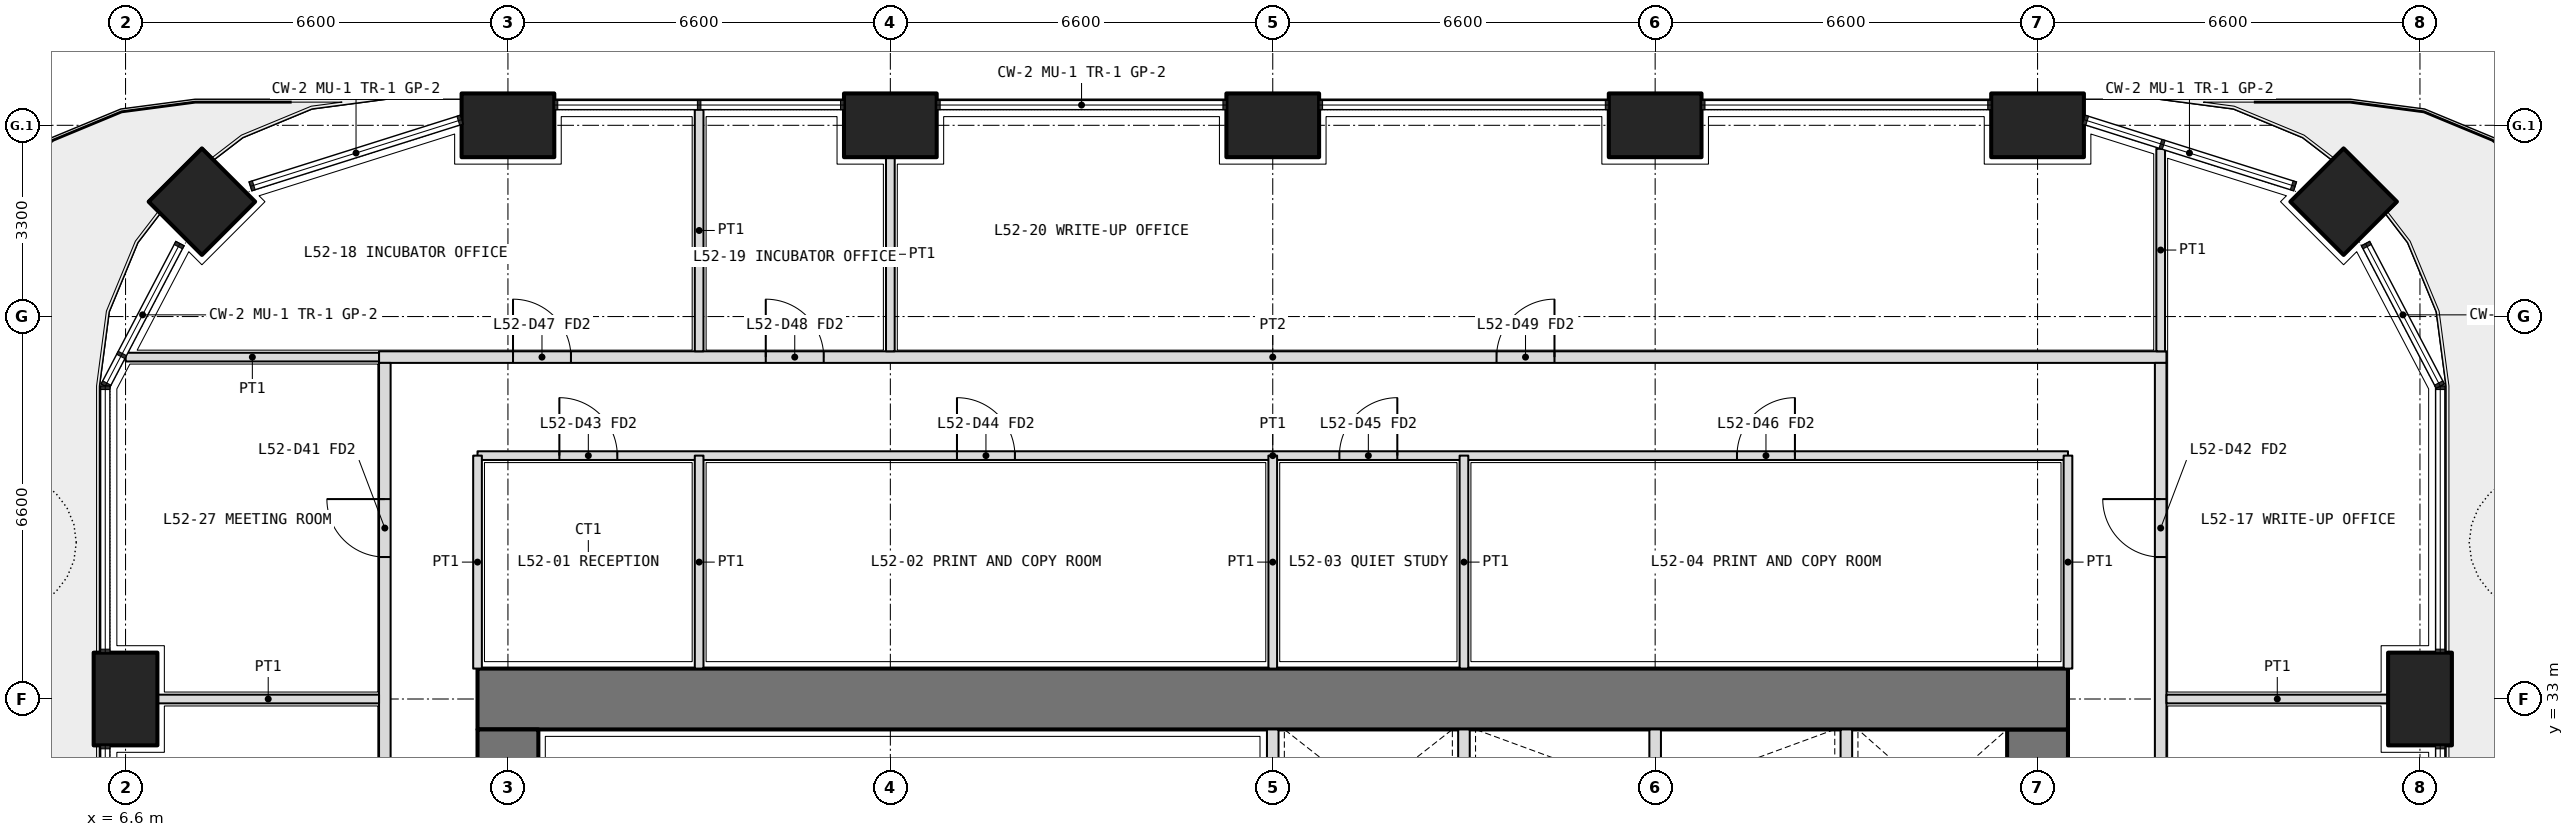
"""IFC4 building model, lengths in metres.
Left out: names, types, materials, properties, quantities, classifications, styles, units other than length and angle.
Written with IfcOpenShell. Run it as: python <this file> out.ifc"""

import sys

from ifc_helpers import new_model, si_unit, direction, frame, frame_2d, origin, origin_2d, place, context, subcontext, project, spatial, rectangle, extrude, element, fill, save


model = new_model("IFC4")
c1 = context("Model", 3, precision=1e-05, world=origin(), true_north=direction((0.0, 1.0)))
c2 = subcontext(c1, "Body", "Model", "MODEL_VIEW")
j1 = project(units=[si_unit("LENGTHUNIT", "METRE"), si_unit("PLANEANGLEUNIT", "RADIAN")], contexts=[c1])
p1 = place(None, origin())
s1 = spatial("IfcSite", under=j1, at=p1, CompositionType="ELEMENT")
p2 = place(p1, origin())
s2 = spatial("IfcBuilding", under=s1, at=p2, CompositionType="ELEMENT")
p3 = place(p2, frame((0.0, 0.0, 229.2)))
s3 = spatial("IfcBuildingStorey", under=s2, at=p3, CompositionType="ELEMENT", Elevation=229.2)
for number, where, z_axis, x_axis in (
    (1, (7.918, 41.582, 0.0), (0.0, 0.0, 1.0), (0.707, 0.707, 0.0)),
    (2, (44.882, 41.582, 0.0), (0.0, 0.0, 1.0), (0.707, 0.707, 0.0)),
):
    element("IfcColumn", number, at=place(p3, frame(where, z_axis=z_axis, x_axis=x_axis)), inside=s3, PredefinedType="COLUMN", context=c2, shape_type="SweptSolid", body=[
        extrude(rectangle(XDim=1.3, YDim=1.3, at=origin_2d()), origin(), (0.0, 0.0, 1.0), 4.2),
    ])
for number, where, z_axis, x_axis in (
    (3, (6.6, 33.0, 0.0), (0.0, 0.0, 1.0), (0.0, 1.0, 0.0)),
    (4, (46.2, 33.0, 0.0), (0.0, 0.0, 1.0), (0.0, 1.0, 0.0)),
    (5, (13.2, 42.9, 0.0), (0.0, 0.0, 1.0), (1.0, 0.0, 0.0)),
    (6, (19.8, 42.9, 0.0), (0.0, 0.0, 1.0), (1.0, 0.0, 0.0)),
    (7, (26.4, 42.9, 0.0), (0.0, 0.0, 1.0), (1.0, 0.0, 0.0)),
    (8, (33.0, 42.9, 0.0), (0.0, 0.0, 1.0), (1.0, 0.0, 0.0)),
    (9, (39.6, 42.9, 0.0), (0.0, 0.0, 1.0), (1.0, 0.0, 0.0)),
):
    element("IfcColumn", number, at=place(p3, frame(where, z_axis=z_axis, x_axis=x_axis)), inside=s3, PredefinedType="COLUMN", context=c2, shape_type="SweptSolid", body=[
        extrude(rectangle(XDim=1.6, YDim=1.1, at=origin_2d()), origin(), (0.0, 0.0, 1.0), 4.2),
    ])
p4 = place(p3, frame((39.6, 13.725, 0.0), z_axis=(0.0, 0.0, 1.0), x_axis=(0.0, 1.0, 0.0)))
e10 = element("IfcWall", 10, at=p4, inside=s3, PredefinedType="SHEAR", context=c2, shape_type="SweptSolid", body=[
    extrude(rectangle(XDim=18.75, YDim=1.05, at=frame_2d((9.375, 0.0))), origin(), (0.0, 0.0, 1.0), 4.2),
])
p5 = place(p4, frame((3.025, 0.0, 0.0)))
e11 = element("IfcOpeningElement", 11, at=p5, cuts=e10, PredefinedType="OPENING", context=c2, shape_type="SweptSolid", body=[
    extrude(rectangle(XDim=1.6, YDim=2.1, at=frame_2d((0.8, 1.05))), frame((0.0, 0.535, 0.0), z_axis=(0.0, -1.0, 0.0), x_axis=(1.0, 0.0, 0.0)), (0.0, 0.0, 1.0), 1.07),
])
p6 = place(p4, frame((13.825, 0.0, 0.0)))
e12 = element("IfcOpeningElement", 12, at=p6, cuts=e10, PredefinedType="OPENING", context=c2, shape_type="SweptSolid", body=[
    extrude(rectangle(XDim=1.6, YDim=2.1, at=frame_2d((0.8, 1.05))), frame((0.0, 0.535, 0.0), z_axis=(0.0, -1.0, 0.0), x_axis=(1.0, 0.0, 0.0)), (0.0, 0.0, 1.0), 1.07),
])
p7 = place(p3, frame((40.125, 33.0, 0.0), z_axis=(0.0, 0.0, 1.0), x_axis=(-1.0, 0.0, 0.0)))
e13 = element("IfcWall", 13, at=p7, inside=s3, PredefinedType="SHEAR", context=c2, shape_type="SweptSolid", body=[
    extrude(rectangle(XDim=27.45, YDim=1.05, at=frame_2d((13.725, 0.0))), origin(), (0.0, 0.0, 1.0), 4.2),
])
p8 = place(p3, frame((13.2, 32.475, 0.0), z_axis=(0.0, 0.0, 1.0), x_axis=(0.0, -1.0, 0.0)))
e14 = element("IfcWall", 14, at=p8, inside=s3, PredefinedType="SHEAR", context=c2, shape_type="SweptSolid", body=[
    extrude(rectangle(XDim=18.75, YDim=1.05, at=frame_2d((9.375, 0.0))), origin(), (0.0, 0.0, 1.0), 4.2),
])
p9 = place(p8, frame((14.125, 0.0, 0.0)))
e15 = element("IfcOpeningElement", 15, at=p9, cuts=e14, PredefinedType="OPENING", context=c2, shape_type="SweptSolid", body=[
    extrude(rectangle(XDim=1.6, YDim=2.1, at=frame_2d((0.8, 1.05))), frame((0.0, 0.535, 0.0), z_axis=(0.0, -1.0, 0.0), x_axis=(1.0, 0.0, 0.0)), (0.0, 0.0, 1.0), 1.07),
])
p10 = place(p8, frame((3.325, 0.0, 0.0)))
e16 = element("IfcOpeningElement", 16, at=p10, cuts=e14, PredefinedType="OPENING", context=c2, shape_type="SweptSolid", body=[
    extrude(rectangle(XDim=1.6, YDim=2.1, at=frame_2d((0.8, 1.05))), frame((0.0, 0.535, 0.0), z_axis=(0.0, -1.0, 0.0), x_axis=(1.0, 0.0, 0.0)), (0.0, 0.0, 1.0), 1.07),
])
for number, where, z_axis, x_axis in (
    (17, (26.4, 30.2, 0.0), (0.0, 0.0, 1.0), (0.0, 1.0, 0.0)),
    (18, (29.7, 30.2, 0.0), (0.0, 0.0, 1.0), (0.0, 1.0, 0.0)),
    (19, (33.0, 30.2, 0.0), (0.0, 0.0, 1.0), (0.0, 1.0, 0.0)),
    (20, (36.3, 30.2, 0.0), (0.0, 0.0, 1.0), (0.0, 1.0, 0.0)),
):
    element("IfcWall", number, at=place(p3, frame(where, z_axis=z_axis, x_axis=x_axis)), inside=s3, PredefinedType="PARTITIONING", context=c2, shape_type="SweptSolid", body=[
        extrude(rectangle(XDim=2.275, YDim=0.2, at=frame_2d((1.138, 0.0))), origin(), (0.0, 0.0, 1.0), 4.2),
    ])
p11 = place(p3, frame((12.675, 37.2, 0.0), z_axis=(0.0, 0.0, 1.0), x_axis=(1.0, 0.0, 0.0)))
e21 = element("IfcWall", 21, at=p11, inside=s3, PredefinedType="PARTITIONING", context=c2, shape_type="SweptSolid", body=[
    extrude(rectangle(XDim=27.45, YDim=0.15, at=frame_2d((13.725, 0.0))), origin(), (0.0, 0.0, 1.0), 3.0),
])
p12 = place(p11, frame((1.413, 0.0, 0.0)))
e22 = element("IfcOpeningElement", 22, at=p12, cuts=e21, PredefinedType="OPENING", context=c2, shape_type="SweptSolid", body=[
    extrude(rectangle(XDim=1.0, YDim=2.1, at=frame_2d((0.5, 1.05))), frame((0.0, 0.085, 0.0), z_axis=(0.0, -1.0, 0.0), x_axis=(1.0, 0.0, 0.0)), (0.0, 0.0, 1.0), 0.17),
])
p13 = place(p11, frame((8.275, 0.0, 0.0)))
e23 = element("IfcOpeningElement", 23, at=p13, cuts=e21, PredefinedType="OPENING", context=c2, shape_type="SweptSolid", body=[
    extrude(rectangle(XDim=1.0, YDim=2.1, at=frame_2d((0.5, 1.05))), frame((0.0, 0.085, 0.0), z_axis=(0.0, -1.0, 0.0), x_axis=(1.0, 0.0, 0.0)), (0.0, 0.0, 1.0), 0.17),
])
p14 = place(p11, frame((14.875, 0.0, 0.0)))
e24 = element("IfcOpeningElement", 24, at=p14, cuts=e21, PredefinedType="OPENING", context=c2, shape_type="SweptSolid", body=[
    extrude(rectangle(XDim=1.0, YDim=2.1, at=frame_2d((0.5, 1.05))), frame((0.0, 0.085, 0.0), z_axis=(0.0, -1.0, 0.0), x_axis=(1.0, 0.0, 0.0)), (0.0, 0.0, 1.0), 0.17),
])
p15 = place(p11, frame((21.738, 0.0, 0.0)))
e25 = element("IfcOpeningElement", 25, at=p15, cuts=e21, PredefinedType="OPENING", context=c2, shape_type="SweptSolid", body=[
    extrude(rectangle(XDim=1.0, YDim=2.1, at=frame_2d((0.5, 1.05))), frame((0.0, 0.085, 0.0), z_axis=(0.0, -1.0, 0.0), x_axis=(1.0, 0.0, 0.0)), (0.0, 0.0, 1.0), 0.17),
])
for number, where, z_axis, x_axis in (
    (26, (12.675, 33.525, 0.0), (0.0, 0.0, 1.0), (0.0, 1.0, 0.0)),
    (27, (40.125, 33.525, 0.0), (0.0, 0.0, 1.0), (0.0, 1.0, 0.0)),
):
    element("IfcWall", number, at=place(p3, frame(where, z_axis=z_axis, x_axis=x_axis)), inside=s3, PredefinedType="PARTITIONING", context=c2, shape_type="SweptSolid", body=[
        extrude(rectangle(XDim=3.675, YDim=0.15, at=frame_2d((1.837, 0.0))), origin(), (0.0, 0.0, 1.0), 3.0),
    ])
p16 = place(p3, frame((16.5, 33.525, 0.0), z_axis=(0.0, 0.0, 1.0), x_axis=(0.0, 1.0, 0.0)))
e28 = element("IfcWall", 28, at=p16, inside=s3, PredefinedType="PARTITIONING", context=c2, shape_type="SweptSolid", body=[
    extrude(rectangle(XDim=3.675, YDim=0.15, at=frame_2d((1.837, 0.0))), origin(), (0.0, 0.0, 1.0), 3.9),
])
p17 = place(p3, frame((26.4, 33.525, 0.0), z_axis=(0.0, 0.0, 1.0), x_axis=(0.0, 1.0, 0.0)))
e29 = element("IfcWall", 29, at=p17, inside=s3, PredefinedType="PARTITIONING", context=c2, shape_type="SweptSolid", body=[
    extrude(rectangle(XDim=3.675, YDim=0.15, at=frame_2d((1.837, 0.0))), origin(), (0.0, 0.0, 1.0), 3.0),
])
p18 = place(p3, frame((29.7, 33.525, 0.0), z_axis=(0.0, 0.0, 1.0), x_axis=(0.0, 1.0, 0.0)))
e30 = element("IfcWall", 30, at=p18, inside=s3, PredefinedType="PARTITIONING", context=c2, shape_type="SweptSolid", body=[
    extrude(rectangle(XDim=3.675, YDim=0.15, at=frame_2d((1.837, 0.0))), origin(), (0.0, 0.0, 1.0), 3.9),
])
p19 = place(p3, frame((10.975, 38.9, 0.0), z_axis=(0.0, 0.0, 1.0), x_axis=(1.0, 0.0, 0.0)))
e31 = element("IfcWall", 31, at=p19, inside=s3, PredefinedType="PARTITIONING", context=c2, shape_type="SweptSolid", body=[
    extrude(rectangle(XDim=30.85, YDim=0.2, at=frame_2d((15.425, 0.0))), origin(), (0.0, 0.0, 1.0), 3.0),
])
p20 = place(p19, frame((2.312, 0.0, 0.0)))
e32 = element("IfcOpeningElement", 32, at=p20, cuts=e31, PredefinedType="OPENING", context=c2, shape_type="SweptSolid", body=[
    extrude(rectangle(XDim=1.0, YDim=2.1, at=frame_2d((0.5, 1.05))), frame((0.0, 0.11, 0.0), z_axis=(0.0, -1.0, 0.0), x_axis=(1.0, 0.0, 0.0)), (0.0, 0.0, 1.0), 0.22),
])
p21 = place(p19, frame((6.675, 0.0, 0.0)))
e33 = element("IfcOpeningElement", 33, at=p21, cuts=e31, PredefinedType="OPENING", context=c2, shape_type="SweptSolid", body=[
    extrude(rectangle(XDim=1.0, YDim=2.1, at=frame_2d((0.5, 1.05))), frame((0.0, 0.11, 0.0), z_axis=(0.0, -1.0, 0.0), x_axis=(1.0, 0.0, 0.0)), (0.0, 0.0, 1.0), 0.22),
])
p22 = place(p19, frame((19.288, 0.0, 0.0)))
e34 = element("IfcOpeningElement", 34, at=p22, cuts=e31, PredefinedType="OPENING", context=c2, shape_type="SweptSolid", body=[
    extrude(rectangle(XDim=1.0, YDim=2.1, at=frame_2d((0.5, 1.05))), frame((0.0, 0.11, 0.0), z_axis=(0.0, -1.0, 0.0), x_axis=(1.0, 0.0, 0.0)), (0.0, 0.0, 1.0), 0.22),
])
p23 = place(p3, frame((11.075, 7.4, 0.0), z_axis=(0.0, 0.0, 1.0), x_axis=(0.0, 1.0, 0.0)))
e35 = element("IfcWall", 35, at=p23, inside=s3, PredefinedType="PARTITIONING", context=c2, shape_type="SweptSolid", body=[
    extrude(rectangle(XDim=31.4, YDim=0.2, at=frame_2d((15.7, 0.0))), origin(), (0.0, 0.0, 1.0), 3.0),
])
p24 = place(p23, frame((2.35, 0.0, 0.0)))
e36 = element("IfcOpeningElement", 36, at=p24, cuts=e35, PredefinedType="OPENING", context=c2, shape_type="SweptSolid", body=[
    extrude(rectangle(XDim=1.0, YDim=2.1, at=frame_2d((0.5, 1.05))), frame((0.0, 0.11, 0.0), z_axis=(0.0, -1.0, 0.0), x_axis=(1.0, 0.0, 0.0)), (0.0, 0.0, 1.0), 0.22),
])
p25 = place(p23, frame((6.35, 0.0, 0.0)))
e37 = element("IfcOpeningElement", 37, at=p25, cuts=e35, PredefinedType="OPENING", context=c2, shape_type="SweptSolid", body=[
    extrude(rectangle(XDim=1.0, YDim=2.1, at=frame_2d((0.5, 1.05))), frame((0.0, 0.11, 0.0), z_axis=(0.0, -1.0, 0.0), x_axis=(1.0, 0.0, 0.0)), (0.0, 0.0, 1.0), 0.22),
])
p26 = place(p23, frame((9.45, 0.0, 0.0)))
e38 = element("IfcOpeningElement", 38, at=p26, cuts=e35, PredefinedType="OPENING", context=c2, shape_type="SweptSolid", body=[
    extrude(rectangle(XDim=0.9, YDim=2.1, at=frame_2d((0.45, 1.05))), frame((0.0, 0.11, 0.0), z_axis=(0.0, -1.0, 0.0), x_axis=(1.0, 0.0, 0.0)), (0.0, 0.0, 1.0), 0.22),
])
p27 = place(p23, frame((13.35, 0.0, 0.0)))
e39 = element("IfcOpeningElement", 39, at=p27, cuts=e35, PredefinedType="OPENING", context=c2, shape_type="SweptSolid", body=[
    extrude(rectangle(XDim=0.9, YDim=2.1, at=frame_2d((0.45, 1.05))), frame((0.0, 0.11, 0.0), z_axis=(0.0, -1.0, 0.0), x_axis=(1.0, 0.0, 0.0)), (0.0, 0.0, 1.0), 0.22),
])
p28 = place(p23, frame((16.85, 0.0, 0.0)))
e40 = element("IfcOpeningElement", 40, at=p28, cuts=e35, PredefinedType="OPENING", context=c2, shape_type="SweptSolid", body=[
    extrude(rectangle(XDim=1.0, YDim=2.1, at=frame_2d((0.5, 1.05))), frame((0.0, 0.11, 0.0), z_axis=(0.0, -1.0, 0.0), x_axis=(1.0, 0.0, 0.0)), (0.0, 0.0, 1.0), 0.22),
])
p29 = place(p23, frame((21.8, 0.0, 0.0)))
e41 = element("IfcOpeningElement", 41, at=p29, cuts=e35, PredefinedType="OPENING", context=c2, shape_type="SweptSolid", body=[
    extrude(rectangle(XDim=1.0, YDim=2.1, at=frame_2d((0.5, 1.05))), frame((0.0, 0.11, 0.0), z_axis=(0.0, -1.0, 0.0), x_axis=(1.0, 0.0, 0.0)), (0.0, 0.0, 1.0), 0.22),
])
p30 = place(p23, frame((28.05, 0.0, 0.0)))
e42 = element("IfcOpeningElement", 42, at=p30, cuts=e35, PredefinedType="OPENING", context=c2, shape_type="SweptSolid", body=[
    extrude(rectangle(XDim=1.0, YDim=2.1, at=frame_2d((0.5, 1.05))), frame((0.0, 0.11, 0.0), z_axis=(0.0, -1.0, 0.0), x_axis=(1.0, 0.0, 0.0)), (0.0, 0.0, 1.0), 0.22),
])
p31 = place(p3, frame((41.725, 19.8, 0.0), z_axis=(0.0, 0.0, 1.0), x_axis=(0.0, 1.0, 0.0)))
e43 = element("IfcWall", 43, at=p31, inside=s3, PredefinedType="PARTITIONING", context=c2, shape_type="SweptSolid", body=[
    extrude(rectangle(XDim=19.0, YDim=0.2, at=frame_2d((9.5, 0.0))), origin(), (0.0, 0.0, 1.0), 3.0),
])
p32 = place(p31, frame((1.1, 0.0, 0.0)))
e44 = element("IfcOpeningElement", 44, at=p32, cuts=e43, PredefinedType="OPENING", context=c2, shape_type="SweptSolid", body=[
    extrude(rectangle(XDim=1.0, YDim=2.1, at=frame_2d((0.5, 1.05))), frame((0.0, 0.11, 0.0), z_axis=(0.0, -1.0, 0.0), x_axis=(1.0, 0.0, 0.0)), (0.0, 0.0, 1.0), 0.22),
])
p33 = place(p31, frame((4.45, 0.0, 0.0)))
e45 = element("IfcOpeningElement", 45, at=p33, cuts=e43, PredefinedType="OPENING", context=c2, shape_type="SweptSolid", body=[
    extrude(rectangle(XDim=0.9, YDim=2.1, at=frame_2d((0.45, 1.05))), frame((0.0, 0.11, 0.0), z_axis=(0.0, -1.0, 0.0), x_axis=(1.0, 0.0, 0.0)), (0.0, 0.0, 1.0), 0.22),
])
p34 = place(p31, frame((9.4, 0.0, 0.0)))
e46 = element("IfcOpeningElement", 46, at=p34, cuts=e43, PredefinedType="OPENING", context=c2, shape_type="SweptSolid", body=[
    extrude(rectangle(XDim=1.0, YDim=2.1, at=frame_2d((0.5, 1.05))), frame((0.0, 0.11, 0.0), z_axis=(0.0, -1.0, 0.0), x_axis=(1.0, 0.0, 0.0)), (0.0, 0.0, 1.0), 0.22),
])
p35 = place(p31, frame((15.65, 0.0, 0.0)))
e47 = element("IfcOpeningElement", 47, at=p35, cuts=e43, PredefinedType="OPENING", context=c2, shape_type="SweptSolid", body=[
    extrude(rectangle(XDim=1.0, YDim=2.1, at=frame_2d((0.5, 1.05))), frame((0.0, 0.11, 0.0), z_axis=(0.0, -1.0, 0.0), x_axis=(1.0, 0.0, 0.0)), (0.0, 0.0, 1.0), 0.22),
])
p36 = place(p3, frame((41.725, 42.495, 0.0), z_axis=(0.0, 0.0, 1.0), x_axis=(0.0, -1.0, 0.0)))
e48 = element("IfcWall", 48, at=p36, inside=s3, PredefinedType="PARTITIONING", context=c2, shape_type="SweptSolid", body=[
    extrude(rectangle(XDim=3.495, YDim=0.15, at=frame_2d((1.748, 0.0))), origin(), (0.0, 0.0, 1.0), 2.7),
])
p37 = place(p3, frame((6.603, 38.9, 0.0), z_axis=(0.0, 0.0, 1.0), x_axis=(1.0, 0.0, 0.0)))
e49 = element("IfcWall", 49, at=p37, inside=s3, PredefinedType="PARTITIONING", context=c2, shape_type="SweptSolid", body=[
    extrude(rectangle(XDim=4.373, YDim=0.15, at=frame_2d((2.186, 0.0))), origin(), (0.0, 0.0, 1.0), 2.7),
])
p38 = place(p3, frame((45.65, 33.0, 0.0), z_axis=(0.0, 0.0, 1.0), x_axis=(-1.0, 0.0, 0.0)))
e50 = element("IfcWall", 50, at=p38, inside=s3, PredefinedType="PARTITIONING", context=c2, shape_type="SweptSolid", body=[
    extrude(rectangle(XDim=3.825, YDim=0.15, at=frame_2d((1.913, 0.0))), origin(), (0.0, 0.0, 1.0), 3.0),
])
p39 = place(p3, frame((16.5, 43.17, 0.0), z_axis=(0.0, 0.0, 1.0), x_axis=(0.0, -1.0, 0.0)))
e51 = element("IfcWall", 51, at=p39, inside=s3, PredefinedType="PARTITIONING", context=c2, shape_type="SweptSolid", body=[
    extrude(rectangle(XDim=4.17, YDim=0.15, at=frame_2d((2.085, 0.0))), origin(), (0.0, 0.0, 1.0), 2.7),
])
p40 = place(p3, frame((19.8, 42.35, 0.0), z_axis=(0.0, 0.0, 1.0), x_axis=(0.0, -1.0, 0.0)))
e52 = element("IfcWall", 52, at=p40, inside=s3, PredefinedType="PARTITIONING", context=c2, shape_type="SweptSolid", body=[
    extrude(rectangle(XDim=3.35, YDim=0.15, at=frame_2d((1.675, 0.0))), origin(), (0.0, 0.0, 1.0), 3.0),
])
p41 = place(p3, frame((7.15, 33.0, 0.0), z_axis=(0.0, 0.0, 1.0), x_axis=(1.0, 0.0, 0.0)))
e53 = element("IfcWall", 53, at=p41, inside=s3, PredefinedType="PARTITIONING", context=c2, shape_type="SweptSolid", body=[
    extrude(rectangle(XDim=3.825, YDim=0.15, at=frame_2d((1.913, 0.0))), origin(), (0.0, 0.0, 1.0), 3.0),
])
p42 = place(p12, origin())
e54 = element("IfcDoor", 54, at=p42, inside=s3, OperationType="SINGLE_SWING_LEFT", PredefinedType="DOOR", context=c2, shape_type="SweptSolid", body=[
    extrude(rectangle(XDim=1.0, YDim=2.1, at=frame_2d((0.5, 1.05))), frame((0.0, 0.025, 0.0), z_axis=(0.0, -1.0, 0.0), x_axis=(1.0, 0.0, 0.0)), (0.0, 0.0, 1.0), 0.05),
])
fill(e22, e54)
p43 = place(p13, origin())
e55 = element("IfcDoor", 55, at=p43, inside=s3, OperationType="SINGLE_SWING_LEFT", PredefinedType="DOOR", context=c2, shape_type="SweptSolid", body=[
    extrude(rectangle(XDim=1.0, YDim=2.1, at=frame_2d((0.5, 1.05))), frame((0.0, 0.025, 0.0), z_axis=(0.0, -1.0, 0.0), x_axis=(1.0, 0.0, 0.0)), (0.0, 0.0, 1.0), 0.05),
])
fill(e23, e55)
p44 = place(p14, origin())
e56 = element("IfcDoor", 56, at=p44, inside=s3, OperationType="SINGLE_SWING_RIGHT", PredefinedType="DOOR", context=c2, shape_type="SweptSolid", body=[
    extrude(rectangle(XDim=1.0, YDim=2.1, at=frame_2d((0.5, 1.05))), frame((0.0, 0.025, 0.0), z_axis=(0.0, -1.0, 0.0), x_axis=(1.0, 0.0, 0.0)), (0.0, 0.0, 1.0), 0.05),
])
fill(e24, e56)
p45 = place(p15, origin())
e57 = element("IfcDoor", 57, at=p45, inside=s3, OperationType="SINGLE_SWING_RIGHT", PredefinedType="DOOR", context=c2, shape_type="SweptSolid", body=[
    extrude(rectangle(XDim=1.0, YDim=2.1, at=frame_2d((0.5, 1.05))), frame((0.0, 0.025, 0.0), z_axis=(0.0, -1.0, 0.0), x_axis=(1.0, 0.0, 0.0)), (0.0, 0.0, 1.0), 0.05),
])
fill(e25, e57)
p46 = place(p35, origin())
e58 = element("IfcDoor", 58, at=p46, inside=s3, OperationType="SINGLE_SWING_RIGHT", PredefinedType="DOOR", context=c2, shape_type="SweptSolid", body=[
    extrude(rectangle(XDim=1.0, YDim=2.1, at=frame_2d((0.5, 1.05))), frame((0.0, 0.025, 0.0), z_axis=(0.0, -1.0, 0.0), x_axis=(1.0, 0.0, 0.0)), (0.0, 0.0, 1.0), 0.05),
])
fill(e47, e58)
p47 = place(p20, origin())
e59 = element("IfcDoor", 59, at=p47, inside=s3, OperationType="SINGLE_SWING_LEFT", PredefinedType="DOOR", context=c2, shape_type="SweptSolid", body=[
    extrude(rectangle(XDim=1.0, YDim=2.1, at=frame_2d((0.5, 1.05))), frame((0.0, 0.025, 0.0), z_axis=(0.0, -1.0, 0.0), x_axis=(1.0, 0.0, 0.0)), (0.0, 0.0, 1.0), 0.05),
])
fill(e32, e59)
p48 = place(p21, origin())
e60 = element("IfcDoor", 60, at=p48, inside=s3, OperationType="SINGLE_SWING_LEFT", PredefinedType="DOOR", context=c2, shape_type="SweptSolid", body=[
    extrude(rectangle(XDim=1.0, YDim=2.1, at=frame_2d((0.5, 1.05))), frame((0.0, 0.025, 0.0), z_axis=(0.0, -1.0, 0.0), x_axis=(1.0, 0.0, 0.0)), (0.0, 0.0, 1.0), 0.05),
])
fill(e33, e60)
p49 = place(p22, origin())
e61 = element("IfcDoor", 61, at=p49, inside=s3, OperationType="SINGLE_SWING_RIGHT", PredefinedType="DOOR", context=c2, shape_type="SweptSolid", body=[
    extrude(rectangle(XDim=1.0, YDim=2.1, at=frame_2d((0.5, 1.05))), frame((0.0, 0.025, 0.0), z_axis=(0.0, -1.0, 0.0), x_axis=(1.0, 0.0, 0.0)), (0.0, 0.0, 1.0), 0.05),
])
fill(e34, e61)
p50 = place(p30, origin())
e62 = element("IfcDoor", 62, at=p50, inside=s3, OperationType="SINGLE_SWING_RIGHT", PredefinedType="DOOR", context=c2, shape_type="SweptSolid", body=[
    extrude(rectangle(XDim=1.0, YDim=2.1, at=frame_2d((0.5, 1.05))), frame((0.0, 0.025, 0.0), z_axis=(0.0, -1.0, 0.0), x_axis=(1.0, 0.0, 0.0)), (0.0, 0.0, 1.0), 0.05),
])
fill(e42, e62)
save(model, sys.argv[1])
